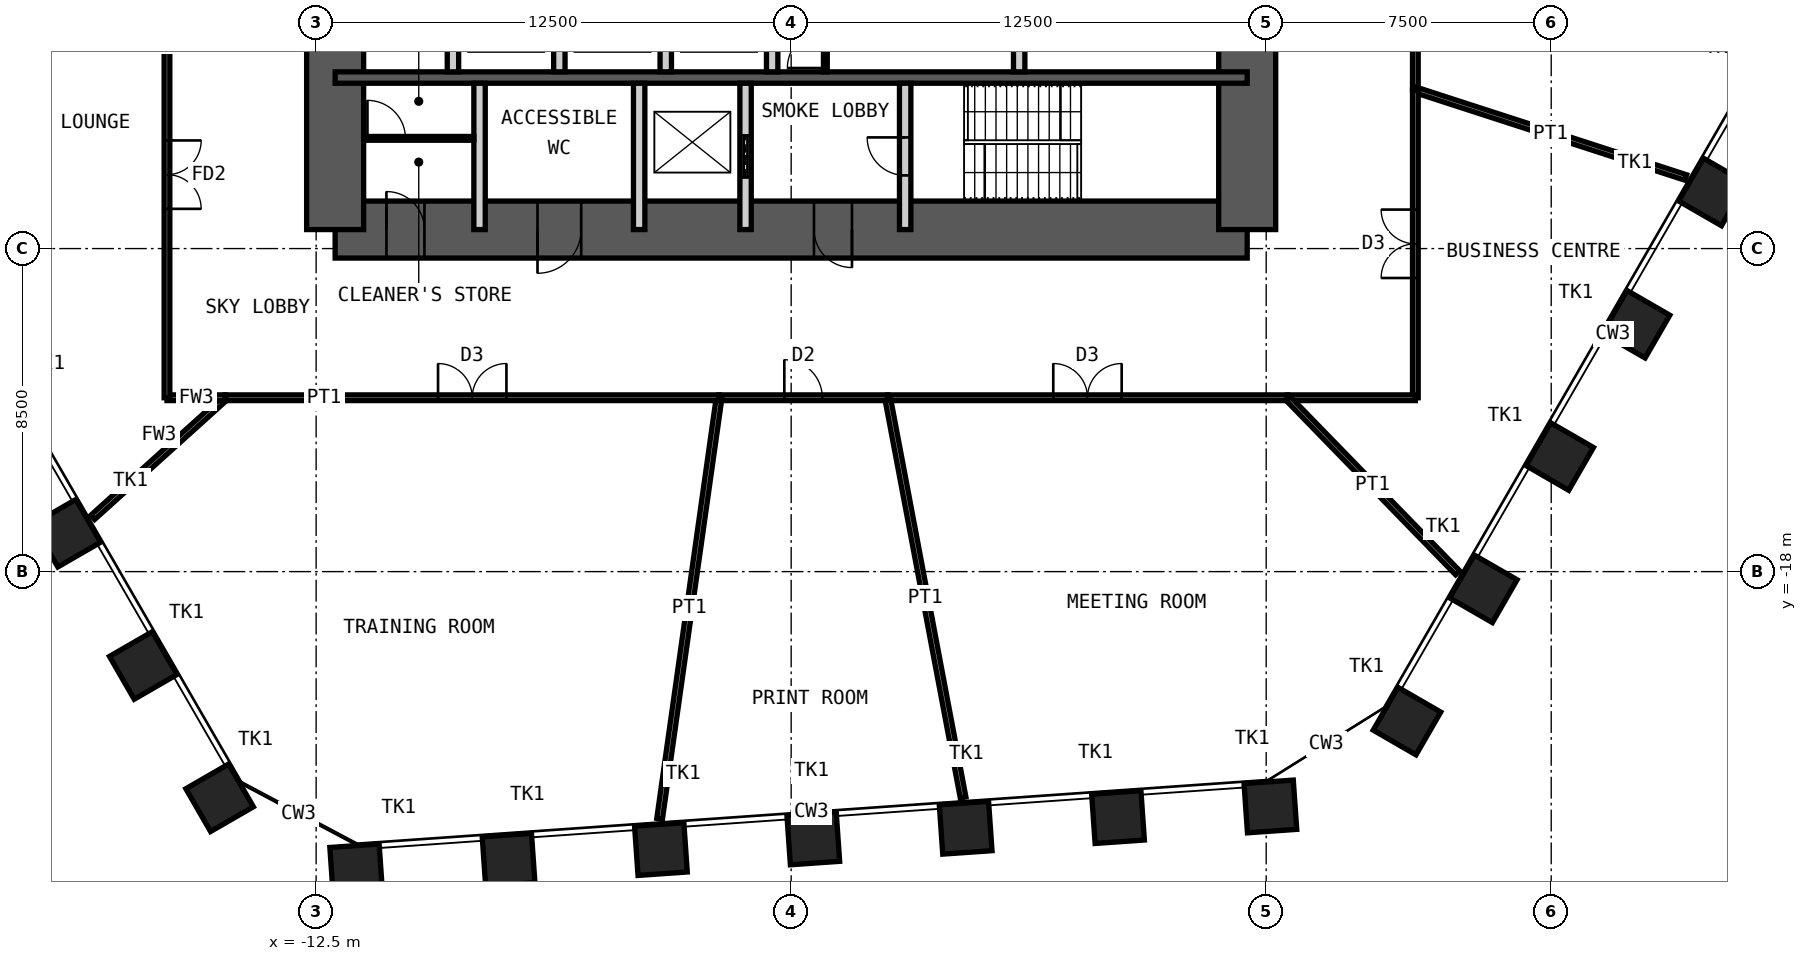
"""IFC4 building model, lengths in metres.
Left out: names, types, materials, properties, quantities, classifications, styles, units other than length and angle.
Written with IfcOpenShell. Run it as: python <this file> out.ifc"""

import sys

from ifc_helpers import new_model, si_unit, direction, frame, frame_2d, origin, origin_2d, place, context, subcontext, project, spatial, rectangle, hollow_rectangle, extrude, element, fill, save


model = new_model("IFC4")
c1 = context("Model", 3, precision=1e-05, world=origin(), true_north=direction((0.0, 1.0)))
c2 = subcontext(c1, "Body", "Model", "MODEL_VIEW")
j1 = project(units=[si_unit("LENGTHUNIT", "METRE"), si_unit("PLANEANGLEUNIT", "RADIAN")], contexts=[c1])
p1 = place(None, origin())
s1 = spatial("IfcSite", under=j1, at=p1, CompositionType="ELEMENT")
p2 = place(p1, origin())
s2 = spatial("IfcBuilding", under=s1, at=p2, CompositionType="ELEMENT")
p3 = place(p2, frame((0.0, 0.0, 103.0)))
s3 = spatial("IfcBuildingStorey", under=s2, at=p3, CompositionType="ELEMENT", Elevation=103.0)
for number, where, z_axis, x_axis in (
    (1, (24.242, -8.011, 0.0), (0.0, 0.0, 1.0), (0.5, 0.866, 0.0)),
    (2, (22.233, -11.491, 0.0), (0.0, 0.0, 1.0), (0.5, 0.866, 0.0)),
    (3, (20.223, -14.972, 0.0), (0.0, 0.0, 1.0), (0.5, 0.866, 0.0)),
    (4, (18.214, -18.453, 0.0), (0.0, 0.0, 1.0), (0.5, 0.866, 0.0)),
    (5, (16.204, -21.933, 0.0), (0.0, 0.0, 1.0), (0.5, 0.866, 0.0)),
    (6, (12.61, -24.179, 0.0), (0.0, 0.0, 1.0), (0.998, 0.07, 0.0)),
    (7, (8.601, -24.46, 0.0), (0.0, 0.0, 1.0), (0.998, 0.07, 0.0)),
    (8, (4.592, -24.74, 0.0), (0.0, 0.0, 1.0), (0.998, 0.07, 0.0)),
    (9, (0.582, -25.02, 0.0), (0.0, 0.0, 1.0), (0.998, 0.07, 0.0)),
    (10, (-3.427, -25.301, 0.0), (0.0, 0.0, 1.0), (0.998, 0.07, 0.0)),
    (11, (-7.436, -25.581, 0.0), (0.0, 0.0, 1.0), (0.998, 0.07, 0.0)),
    (12, (-11.446, -25.861, 0.0), (0.0, 0.0, 1.0), (0.998, 0.07, 0.0)),
    (13, (-15.04, -23.95, 0.0), (0.0, 0.0, 1.0), (0.5, -0.866, 0.0)),
    (14, (-17.049, -20.47, 0.0), (0.0, 0.0, 1.0), (0.5, -0.866, 0.0)),
    (15, (-19.059, -16.989, 0.0), (0.0, 0.0, 1.0), (0.5, -0.866, 0.0)),
):
    element("IfcColumn", number, at=place(p3, frame(where, z_axis=z_axis, x_axis=x_axis)), inside=s3, PredefinedType="COLUMN", context=c2, shape_type="SweptSolid", body=[
        extrude(hollow_rectangle(XDim=1.3, YDim=1.3, WallThickness=0.1, at=origin_2d()), origin(), (0.0, 0.0, 1.0), 4.2),
    ])
p4 = place(p3, frame((-12.0, -9.0, 0.0), z_axis=(0.0, 0.0, 1.0), x_axis=(1.0, 0.0, 0.0)))
e16 = element("IfcWall", 16, at=p4, inside=s3, PredefinedType="SHEAR", context=c2, shape_type="SweptSolid", body=[
    extrude(rectangle(XDim=24.0, YDim=1.5, at=frame_2d((12.0, 0.0))), origin(), (0.0, 0.0, 1.0), 4.2),
])
p5 = place(p4, frame((1.35, 0.0, 0.0)))
e17 = element("IfcOpeningElement", 17, at=p5, cuts=e16, PredefinedType="OPENING", context=c2, shape_type="SweptSolid", body=[
    extrude(rectangle(XDim=1.0, YDim=2.1, at=frame_2d((0.5, 1.05))), frame((0.0, 0.76, 0.0), z_axis=(0.0, -1.0, 0.0), x_axis=(1.0, 0.0, 0.0)), (0.0, 0.0, 1.0), 1.52),
])
p6 = place(p4, frame((5.325, 0.0, 0.0)))
e18 = element("IfcOpeningElement", 18, at=p6, cuts=e16, PredefinedType="OPENING", context=c2, shape_type="SweptSolid", body=[
    extrude(rectangle(XDim=1.15, YDim=2.1, at=frame_2d((0.575, 1.05))), frame((0.0, 0.76, 0.0), z_axis=(0.0, -1.0, 0.0), x_axis=(1.0, 0.0, 0.0)), (0.0, 0.0, 1.0), 1.52),
])
p7 = place(p4, frame((12.6, 0.0, 0.0)))
e19 = element("IfcOpeningElement", 19, at=p7, cuts=e16, PredefinedType="OPENING", context=c2, shape_type="SweptSolid", body=[
    extrude(rectangle(XDim=1.0, YDim=2.1, at=frame_2d((0.5, 1.05))), frame((0.0, 0.76, 0.0), z_axis=(0.0, -1.0, 0.0), x_axis=(1.0, 0.0, 0.0)), (0.0, 0.0, 1.0), 1.52),
])
p8 = place(p3, frame((12.0, -9.0, 0.0), z_axis=(0.0, 0.0, 1.0), x_axis=(0.0, 1.0, 0.0)))
e20 = element("IfcWall", 20, at=p8, inside=s3, PredefinedType="SHEAR", context=c2, shape_type="SweptSolid", body=[
    extrude(rectangle(XDim=18.0, YDim=1.5, at=frame_2d((9.0, 0.0))), origin(), (0.0, 0.0, 1.0), 4.2),
])
p9 = place(p8, frame((8.1, 0.0, 0.0)))
e21 = element("IfcOpeningElement", 21, at=p9, cuts=e20, PredefinedType="OPENING", context=c2, shape_type="SweptSolid", body=[
    extrude(rectangle(XDim=1.8, YDim=2.1, at=frame_2d((0.9, 1.05))), frame((0.0, 0.76, 0.0), z_axis=(0.0, -1.0, 0.0), x_axis=(1.0, 0.0, 0.0)), (0.0, 0.0, 1.0), 1.52),
])
p10 = place(p3, frame((-12.0, -9.0, 0.0), z_axis=(0.0, 0.0, 1.0), x_axis=(0.0, 1.0, 0.0)))
e22 = element("IfcWall", 22, at=p10, inside=s3, PredefinedType="SHEAR", context=c2, shape_type="SweptSolid", body=[
    extrude(rectangle(XDim=18.0, YDim=1.5, at=frame_2d((9.0, 0.0))), origin(), (0.0, 0.0, 1.0), 4.2),
])
p11 = place(p10, frame((8.1, 0.0, 0.0)))
e23 = element("IfcOpeningElement", 23, at=p11, cuts=e22, PredefinedType="OPENING", context=c2, shape_type="SweptSolid", body=[
    extrude(rectangle(XDim=1.8, YDim=2.1, at=frame_2d((0.9, 1.05))), frame((0.0, 0.76, 0.0), z_axis=(0.0, -1.0, 0.0), x_axis=(1.0, 0.0, 0.0)), (0.0, 0.0, 1.0), 1.52),
])
p12 = place(p3, frame((-12.0, -5.0, 0.0), z_axis=(0.0, 0.0, 1.0), x_axis=(1.0, 0.0, 0.0)))
e24 = element("IfcWall", 24, at=p12, inside=s3, PredefinedType="SHEAR", context=c2, shape_type="SweptSolid", body=[
    extrude(rectangle(XDim=24.0, YDim=0.3, at=frame_2d((12.0, 0.0))), origin(), (0.0, 0.0, 1.0), 4.2),
])
for number, where, z_axis, x_axis in (
    (25, (-8.9, -4.85, 0.0), (0.0, 0.0, 1.0), (0.0, 1.0, 0.0)),
    (26, (-6.1, -4.85, 0.0), (0.0, 0.0, 1.0), (0.0, 1.0, 0.0)),
    (27, (-3.3, -4.85, 0.0), (0.0, 0.0, 1.0), (0.0, 1.0, 0.0)),
    (28, (-0.5, -4.85, 0.0), (0.0, 0.0, 1.0), (0.0, 1.0, 0.0)),
    (29, (6.0, -4.85, 0.0), (0.0, 0.0, 1.0), (0.0, 1.0, 0.0)),
):
    element("IfcWall", number, at=place(p3, frame(where, z_axis=z_axis, x_axis=x_axis)), inside=s3, PredefinedType="PARTITIONING", context=c2, shape_type="SweptSolid", body=[
        extrude(rectangle(XDim=2.65, YDim=0.3, at=frame_2d((1.325, 0.0))), origin(), (0.0, 0.0, 1.0), 3.98),
    ])
for number, where, z_axis, x_axis in (
    (30, (-8.2, -9.0, 0.0), (0.0, 0.0, 1.0), (0.0, 1.0, 0.0)),
    (31, (-4.0, -9.0, 0.0), (0.0, 0.0, 1.0), (0.0, 1.0, 0.0)),
):
    element("IfcWall", number, at=place(p3, frame(where, z_axis=z_axis, x_axis=x_axis)), inside=s3, PredefinedType="PARTITIONING", context=c2, shape_type="SweptSolid", body=[
        extrude(rectangle(XDim=3.85, YDim=0.3, at=frame_2d((1.925, 0.0))), origin(), (0.0, 0.0, 1.0), 3.98),
    ])
p13 = place(p3, frame((-1.2, -9.0, 0.0), z_axis=(0.0, 0.0, 1.0), x_axis=(0.0, 1.0, 0.0)))
e32 = element("IfcWall", 32, at=p13, inside=s3, PredefinedType="PARTITIONING", context=c2, shape_type="SweptSolid", body=[
    extrude(rectangle(XDim=3.85, YDim=0.3, at=frame_2d((1.925, 0.0))), origin(), (0.0, 0.0, 1.0), 3.98),
])
p14 = place(p13, frame((1.375, 0.0, 0.0)))
e33 = element("IfcOpeningElement", 33, at=p14, cuts=e32, PredefinedType="OPENING", context=c2, shape_type="SweptSolid", body=[
    extrude(rectangle(XDim=1.1, YDim=2.4, at=frame_2d((0.55, 1.2))), frame((0.0, 0.16, 0.0), z_axis=(0.0, -1.0, 0.0), x_axis=(1.0, 0.0, 0.0)), (0.0, 0.0, 1.0), 0.32),
])
p15 = place(p3, frame((3.0, -9.0, 0.0), z_axis=(0.0, 0.0, 1.0), x_axis=(0.0, 1.0, 0.0)))
e34 = element("IfcWall", 34, at=p15, inside=s3, PredefinedType="PARTITIONING", context=c2, shape_type="SweptSolid", body=[
    extrude(rectangle(XDim=3.85, YDim=0.3, at=frame_2d((1.925, 0.0))), origin(), (0.0, 0.0, 1.0), 3.98),
])
p16 = place(p15, frame((1.425, 0.0, 0.0)))
e35 = element("IfcOpeningElement", 35, at=p16, cuts=e34, PredefinedType="OPENING", context=c2, shape_type="SweptSolid", body=[
    extrude(rectangle(XDim=1.0, YDim=2.1, at=frame_2d((0.5, 1.05))), frame((0.0, 0.16, 0.0), z_axis=(0.0, -1.0, 0.0), x_axis=(1.0, 0.0, 0.0)), (0.0, 0.0, 1.0), 0.32),
])
p17 = place(p3, frame((0.9, -4.85, 0.0), z_axis=(0.0, 0.0, 1.0), x_axis=(0.0, 1.0, 0.0)))
e36 = element("IfcWall", 36, at=p17, inside=s3, PredefinedType="PARTITIONING", context=c2, shape_type="SweptSolid", body=[
    extrude(rectangle(XDim=2.65, YDim=0.1, at=frame_2d((1.325, 0.0))), origin(), (0.0, 0.0, 1.0), 3.98),
])
p18 = place(p17, frame((0.1, 0.0, 0.0)))
e37 = element("IfcOpeningElement", 37, at=p18, cuts=e36, PredefinedType="OPENING", context=c2, shape_type="SweptSolid", body=[
    extrude(rectangle(XDim=1.0, YDim=2.4, at=frame_2d((0.5, 1.2))), frame((0.0, 0.06, 0.0), z_axis=(0.0, -1.0, 0.0), x_axis=(1.0, 0.0, 0.0)), (0.0, 0.0, 1.0), 0.12),
])
p19 = place(p3, frame((-11.25, -6.6, 0.0), z_axis=(0.0, 0.0, 1.0), x_axis=(1.0, 0.0, 0.0)))
e38 = element("IfcWall", 38, at=p19, inside=s3, PredefinedType="PARTITIONING", context=c2, shape_type="SweptSolid", body=[
    extrude(rectangle(XDim=2.9, YDim=0.1, at=frame_2d((1.45, 0.0))), origin(), (0.0, 0.0, 1.0), 3.98),
])
p20 = place(p19, frame((0.1, 0.0, 0.0)))
e39 = element("IfcOpeningElement", 39, at=p20, cuts=e38, PredefinedType="OPENING", context=c2, shape_type="SweptSolid", body=[
    extrude(rectangle(XDim=1.0, YDim=2.4, at=frame_2d((0.5, 1.2))), frame((0.0, 0.06, 0.0), z_axis=(0.0, -1.0, 0.0), x_axis=(1.0, 0.0, 0.0)), (0.0, 0.0, 1.0), 0.12),
])
p21 = place(p3, frame((16.425, 3.87, 0.0), z_axis=(0.0, 0.0, 1.0), x_axis=(0.0, -1.0, 0.0)))
e40 = element("IfcWall", 40, at=p21, inside=s3, PredefinedType="PARTITIONING", context=c2, shape_type="SweptSolid", body=[
    extrude(rectangle(XDim=9.194, YDim=0.15, at=frame_2d((4.597, 0.0))), origin(), (0.0, 0.0, 1.0), 4.03),
])
p22 = place(p21, frame((3.697, 0.0, 0.0)))
e41 = element("IfcOpeningElement", 41, at=p22, cuts=e40, PredefinedType="OPENING", context=c2, shape_type="SweptSolid", body=[
    extrude(rectangle(XDim=1.8, YDim=2.4, at=frame_2d((0.9, 1.2))), frame((0.0, 0.085, 0.0), z_axis=(0.0, -1.0, 0.0), x_axis=(1.0, 0.0, 0.0)), (0.0, 0.0, 1.0), 0.17),
])
p23 = place(p3, frame((23.541, -7.63, 0.0), z_axis=(0.0, 0.0, 1.0), x_axis=(-0.951281044472, 0.308325111577, 0.0)))
e42 = element("IfcWall", 42, at=p23, inside=s3, PredefinedType="PARTITIONING", context=c2, shape_type="SweptSolid", body=[
    extrude(rectangle(XDim=7.48, YDim=0.15, at=frame_2d((3.74, 0.0))), origin(), (0.0, 0.0, 1.0), 2.93),
])
p24 = place(p3, frame((16.425, -5.324, 0.0), z_axis=(0.0, 0.0, 1.0), x_axis=(0.0, -1.0, 0.0)))
e43 = element("IfcWall", 43, at=p24, inside=s3, PredefinedType="PARTITIONING", context=c2, shape_type="SweptSolid", body=[
    extrude(rectangle(XDim=8.101, YDim=0.15, at=frame_2d((4.051, 0.0))), origin(), (0.0, 0.0, 1.0), 4.03),
])
p25 = place(p24, frame((3.151, 0.0, 0.0)))
e44 = element("IfcOpeningElement", 44, at=p25, cuts=e43, PredefinedType="OPENING", context=c2, shape_type="SweptSolid", body=[
    extrude(rectangle(XDim=1.8, YDim=2.4, at=frame_2d((0.9, 1.2))), frame((0.0, 0.085, 0.0), z_axis=(0.0, -1.0, 0.0), x_axis=(1.0, 0.0, 0.0)), (0.0, 0.0, 1.0), 0.17),
])
p26 = place(p3, frame((16.425, -13.425, 0.0), z_axis=(0.0, 0.0, 1.0), x_axis=(-1.0, 0.0, 0.0)))
e45 = element("IfcWall", 45, at=p26, inside=s3, PredefinedType="PARTITIONING", context=c2, shape_type="SweptSolid", body=[
    extrude(rectangle(XDim=3.367, YDim=0.15, at=frame_2d((1.684, 0.0))), origin(), (0.0, 0.0, 1.0), 4.03),
])
p27 = place(p3, frame((17.538, -18.031, 0.0), z_axis=(0.0, 0.0, 1.0), x_axis=(-0.697235728125, 0.716841920807, 0.0)))
e46 = element("IfcWall", 46, at=p27, inside=s3, PredefinedType="PARTITIONING", context=c2, shape_type="SweptSolid", body=[
    extrude(rectangle(XDim=6.425, YDim=0.15, at=frame_2d((3.213, 0.0))), origin(), (0.0, 0.0, 1.0), 2.93),
])
p28 = place(p3, frame((13.058, -13.425, 0.0), z_axis=(0.0, 0.0, 1.0), x_axis=(-1.0, 0.0, 0.0)))
e47 = element("IfcWall", 47, at=p28, inside=s3, PredefinedType="PARTITIONING", context=c2, shape_type="SweptSolid", body=[
    extrude(rectangle(XDim=10.521, YDim=0.15, at=frame_2d((5.261, 0.0))), origin(), (0.0, 0.0, 1.0), 4.03),
])
p29 = place(p28, frame((4.361, 0.0, 0.0)))
e48 = element("IfcOpeningElement", 48, at=p29, cuts=e47, PredefinedType="OPENING", context=c2, shape_type="SweptSolid", body=[
    extrude(rectangle(XDim=1.8, YDim=2.4, at=frame_2d((0.9, 1.2))), frame((0.0, 0.085, 0.0), z_axis=(0.0, -1.0, 0.0), x_axis=(1.0, 0.0, 0.0)), (0.0, 0.0, 1.0), 0.17),
])
p30 = place(p3, frame((4.524, -23.943, 0.0), z_axis=(0.0, 0.0, 1.0), x_axis=(-0.185675041542, 0.982611204367, 0.0)))
e49 = element("IfcWall", 49, at=p30, inside=s3, PredefinedType="PARTITIONING", context=c2, shape_type="SweptSolid", body=[
    extrude(rectangle(XDim=10.704, YDim=0.15, at=frame_2d((5.352, 0.0))), origin(), (0.0, 0.0, 1.0), 2.93),
])
p31 = place(p3, frame((2.537, -13.425, 0.0), z_axis=(0.0, 0.0, 1.0), x_axis=(-1.0, 0.0, 0.0)))
e50 = element("IfcWall", 50, at=p31, inside=s3, PredefinedType="PARTITIONING", context=c2, shape_type="SweptSolid", body=[
    extrude(rectangle(XDim=4.433, YDim=0.15, at=frame_2d((2.217, 0.0))), origin(), (0.0, 0.0, 1.0), 4.03),
])
p32 = place(p31, frame((1.717, 0.0, 0.0)))
e51 = element("IfcOpeningElement", 51, at=p32, cuts=e50, PredefinedType="OPENING", context=c2, shape_type="SweptSolid", body=[
    extrude(rectangle(XDim=1.0, YDim=2.4, at=frame_2d((0.5, 1.2))), frame((0.0, 0.085, 0.0), z_axis=(0.0, -1.0, 0.0), x_axis=(1.0, 0.0, 0.0)), (0.0, 0.0, 1.0), 0.17),
])
p33 = place(p3, frame((-3.462, -24.503, 0.0), z_axis=(0.0, 0.0, 1.0), x_axis=(0.139893725594, 0.990166524146, 0.0)))
e52 = element("IfcWall", 52, at=p33, inside=s3, PredefinedType="PARTITIONING", context=c2, shape_type="SweptSolid", body=[
    extrude(rectangle(XDim=11.188, YDim=0.15, at=frame_2d((5.594, 0.0))), origin(), (0.0, 0.0, 1.0), 2.93),
])
p34 = place(p3, frame((-1.897, -13.425, 0.0), z_axis=(0.0, 0.0, 1.0), x_axis=(-1.0, 0.0, 0.0)))
e53 = element("IfcWall", 53, at=p34, inside=s3, PredefinedType="PARTITIONING", context=c2, shape_type="SweptSolid", body=[
    extrude(rectangle(XDim=12.991, YDim=0.15, at=frame_2d((6.496, 0.0))), origin(), (0.0, 0.0, 1.0), 4.03),
])
p35 = place(p34, frame((5.596, 0.0, 0.0)))
e54 = element("IfcOpeningElement", 54, at=p35, cuts=e53, PredefinedType="OPENING", context=c2, shape_type="SweptSolid", body=[
    extrude(rectangle(XDim=1.8, YDim=2.4, at=frame_2d((0.9, 1.2))), frame((0.0, 0.085, 0.0), z_axis=(0.0, -1.0, 0.0), x_axis=(1.0, 0.0, 0.0)), (0.0, 0.0, 1.0), 0.17),
])
p36 = place(p3, frame((-18.378, -16.572, 0.0), z_axis=(0.0, 0.0, 1.0), x_axis=(0.742684208647, 0.669641819353, 0.0)))
e55 = element("IfcWall", 55, at=p36, inside=s3, PredefinedType="PARTITIONING", context=c2, shape_type="SweptSolid", body=[
    extrude(rectangle(XDim=4.699, YDim=0.15, at=frame_2d((2.35, 0.0))), origin(), (0.0, 0.0, 1.0), 2.93),
])
p37 = place(p3, frame((-14.888, -13.425, 0.0), z_axis=(0.0, 0.0, 1.0), x_axis=(-1.0, 0.0, 0.0)))
e56 = element("IfcWall", 56, at=p37, inside=s3, PredefinedType="PARTITIONING", context=c2, shape_type="SweptSolid", body=[
    extrude(rectangle(XDim=1.537, YDim=0.15, at=frame_2d((0.769, 0.0))), origin(), (0.0, 0.0, 1.0), 4.03),
])
p38 = place(p3, frame((-16.425, -13.425, 0.0), z_axis=(0.0, 0.0, 1.0), x_axis=(0.0, 1.0, 0.0)))
e57 = element("IfcWall", 57, at=p38, inside=s3, PredefinedType="PARTITIONING", context=c2, shape_type="SweptSolid", body=[
    extrude(rectangle(XDim=11.741, YDim=0.15, at=frame_2d((5.87, 0.0))), origin(), (0.0, 0.0, 1.0), 4.03),
])
p39 = place(p38, frame((4.97, 0.0, 0.0)))
e58 = element("IfcOpeningElement", 58, at=p39, cuts=e57, PredefinedType="OPENING", context=c2, shape_type="SweptSolid", body=[
    extrude(rectangle(XDim=1.8, YDim=2.1, at=frame_2d((0.9, 1.05))), frame((0.0, 0.085, 0.0), z_axis=(0.0, -1.0, 0.0), x_axis=(1.0, 0.0, 0.0)), (0.0, 0.0, 1.0), 0.17),
])
p40 = place(p5, origin())
e59 = element("IfcDoor", 59, at=p40, inside=s3, OperationType="SINGLE_SWING_RIGHT", PredefinedType="DOOR", context=c2, shape_type="SweptSolid", body=[
    extrude(rectangle(XDim=1.0, YDim=2.1, at=frame_2d((0.5, 1.05))), frame((0.0, 0.025, 0.0), z_axis=(0.0, -1.0, 0.0), x_axis=(1.0, 0.0, 0.0)), (0.0, 0.0, 1.0), 0.05),
])
fill(e17, e59)
p41 = place(p6, origin())
e60 = element("IfcDoor", 60, at=p41, inside=s3, OperationType="SINGLE_SWING_LEFT", PredefinedType="DOOR", context=c2, shape_type="SweptSolid", body=[
    extrude(rectangle(XDim=1.15, YDim=2.1, at=frame_2d((0.575, 1.05))), frame((0.0, 0.025, 0.0), z_axis=(0.0, -1.0, 0.0), x_axis=(1.0, 0.0, 0.0)), (0.0, 0.0, 1.0), 0.05),
])
fill(e18, e60)
p42 = place(p7, origin())
e61 = element("IfcDoor", 61, at=p42, inside=s3, OperationType="SINGLE_SWING_RIGHT", PredefinedType="DOOR", context=c2, shape_type="SweptSolid", body=[
    extrude(rectangle(XDim=1.0, YDim=2.1, at=frame_2d((0.5, 1.05))), frame((0.0, 0.025, 0.0), z_axis=(0.0, -1.0, 0.0), x_axis=(1.0, 0.0, 0.0)), (0.0, 0.0, 1.0), 0.05),
])
fill(e19, e61)
p43 = place(p16, origin())
e62 = element("IfcDoor", 62, at=p43, inside=s3, OperationType="SINGLE_SWING_LEFT", PredefinedType="DOOR", context=c2, shape_type="SweptSolid", body=[
    extrude(rectangle(XDim=1.0, YDim=2.1, at=frame_2d((0.5, 1.05))), frame((0.0, 0.025, 0.0), z_axis=(0.0, -1.0, 0.0), x_axis=(1.0, 0.0, 0.0)), (0.0, 0.0, 1.0), 0.05),
])
fill(e35, e62)
p44 = place(p14, origin())
e63 = element("IfcDoor", 63, at=p44, inside=s3, OperationType="DOUBLE_DOOR_SLIDING", PredefinedType="DOOR", context=c2, shape_type="SweptSolid", body=[
    extrude(rectangle(XDim=1.1, YDim=2.4, at=frame_2d((0.55, 1.2))), frame((0.0, 0.025, 0.0), z_axis=(0.0, -1.0, 0.0), x_axis=(1.0, 0.0, 0.0)), (0.0, 0.0, 1.0), 0.05),
])
fill(e33, e63)
p45 = place(p18, origin())
e64 = element("IfcDoor", 64, at=p45, inside=s3, OperationType="SINGLE_SWING_RIGHT", PredefinedType="DOOR", context=c2, shape_type="SweptSolid", body=[
    extrude(rectangle(XDim=1.0, YDim=2.4, at=frame_2d((0.5, 1.2))), frame((0.0, 0.025, 0.0), z_axis=(0.0, -1.0, 0.0), x_axis=(1.0, 0.0, 0.0)), (0.0, 0.0, 1.0), 0.05),
])
fill(e37, e64)
p46 = place(p20, origin())
e65 = element("IfcDoor", 65, at=p46, inside=s3, OperationType="SINGLE_SWING_RIGHT", PredefinedType="DOOR", context=c2, shape_type="SweptSolid", body=[
    extrude(rectangle(XDim=1.0, YDim=2.4, at=frame_2d((0.5, 1.2))), frame((0.0, 0.025, 0.0), z_axis=(0.0, -1.0, 0.0), x_axis=(1.0, 0.0, 0.0)), (0.0, 0.0, 1.0), 0.05),
])
fill(e39, e65)
p47 = place(p25, origin())
e66 = element("IfcDoor", 66, at=p47, inside=s3, OperationType="DOUBLE_DOOR_DOUBLE_SWING", PredefinedType="DOOR", context=c2, shape_type="SweptSolid", body=[
    extrude(rectangle(XDim=1.8, YDim=2.4, at=frame_2d((0.9, 1.2))), frame((0.0, 0.025, 0.0), z_axis=(0.0, -1.0, 0.0), x_axis=(1.0, 0.0, 0.0)), (0.0, 0.0, 1.0), 0.05),
])
fill(e44, e66)
p48 = place(p29, origin())
e67 = element("IfcDoor", 67, at=p48, inside=s3, OperationType="DOUBLE_DOOR_DOUBLE_SWING", PredefinedType="DOOR", context=c2, shape_type="SweptSolid", body=[
    extrude(rectangle(XDim=1.8, YDim=2.4, at=frame_2d((0.9, 1.2))), frame((0.0, 0.025, 0.0), z_axis=(0.0, -1.0, 0.0), x_axis=(1.0, 0.0, 0.0)), (0.0, 0.0, 1.0), 0.05),
])
fill(e48, e67)
p49 = place(p32, origin())
e68 = element("IfcDoor", 68, at=p49, inside=s3, OperationType="SINGLE_SWING_RIGHT", PredefinedType="DOOR", context=c2, shape_type="SweptSolid", body=[
    extrude(rectangle(XDim=1.0, YDim=2.4, at=frame_2d((0.5, 1.2))), frame((0.0, 0.025, 0.0), z_axis=(0.0, -1.0, 0.0), x_axis=(1.0, 0.0, 0.0)), (0.0, 0.0, 1.0), 0.05),
])
fill(e51, e68)
p50 = place(p35, origin())
e69 = element("IfcDoor", 69, at=p50, inside=s3, OperationType="DOUBLE_DOOR_DOUBLE_SWING", PredefinedType="DOOR", context=c2, shape_type="SweptSolid", body=[
    extrude(rectangle(XDim=1.8, YDim=2.4, at=frame_2d((0.9, 1.2))), frame((0.0, 0.025, 0.0), z_axis=(0.0, -1.0, 0.0), x_axis=(1.0, 0.0, 0.0)), (0.0, 0.0, 1.0), 0.05),
])
fill(e54, e69)
p51 = place(p39, origin())
e70 = element("IfcDoor", 70, at=p51, inside=s3, OperationType="DOUBLE_DOOR_DOUBLE_SWING", PredefinedType="DOOR", context=c2, shape_type="SweptSolid", body=[
    extrude(rectangle(XDim=1.8, YDim=2.1, at=frame_2d((0.9, 1.05))), frame((0.0, 0.025, 0.0), z_axis=(0.0, -1.0, 0.0), x_axis=(1.0, 0.0, 0.0)), (0.0, 0.0, 1.0), 0.05),
])
fill(e58, e70)
save(model, sys.argv[1])
